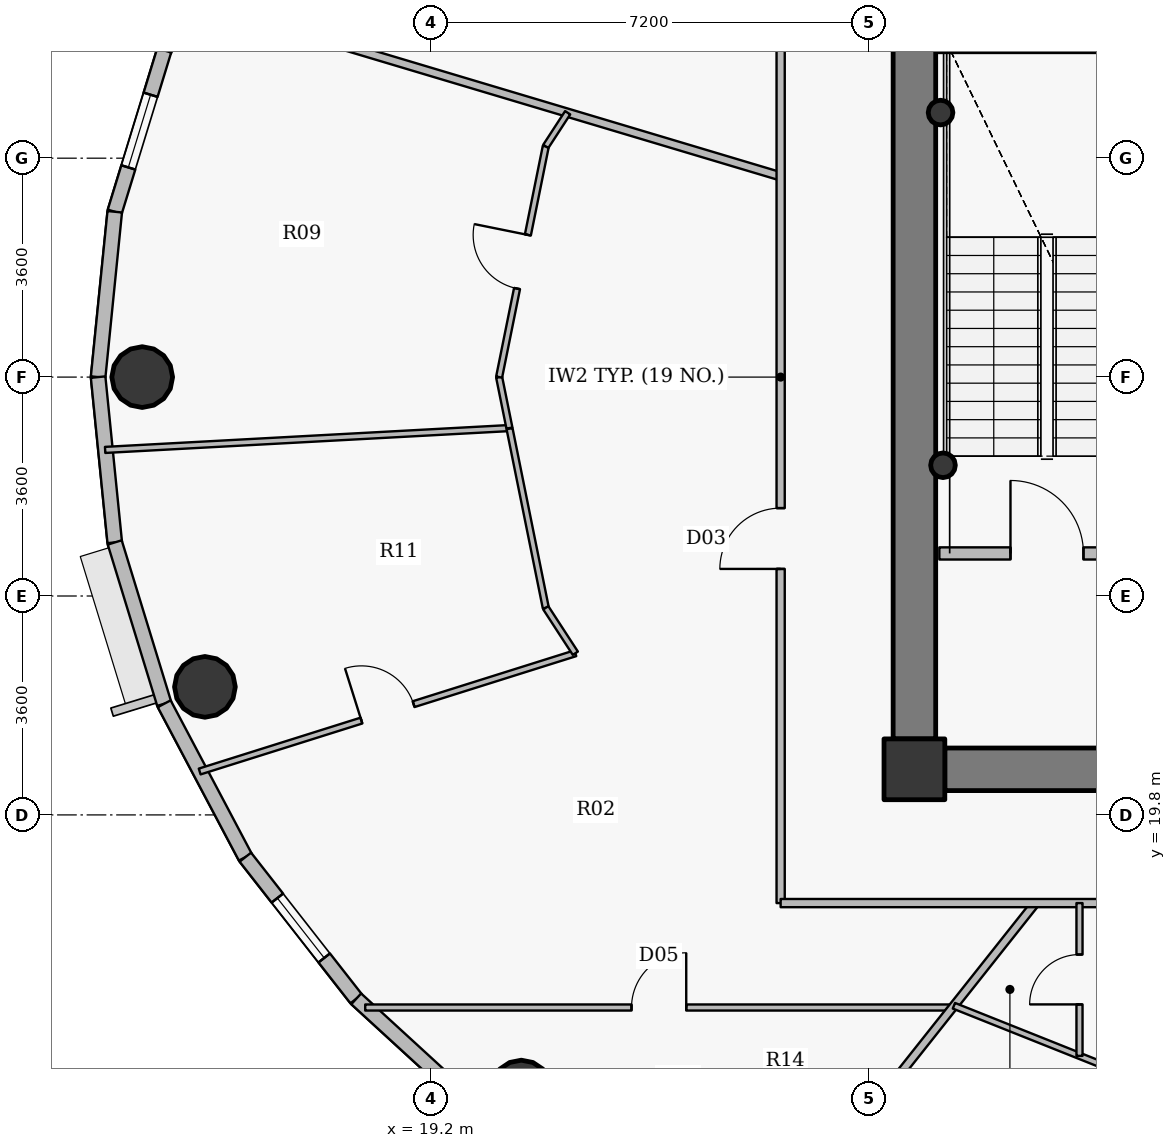
"""IFC4 building model, lengths in metres.
Left out: names, types, materials, properties, quantities, classifications, styles, units other than length and angle.
Written with IfcOpenShell. Run it as: python <this file> out.ifc"""

import sys

from ifc_helpers import new_model, si_unit, direction, frame, frame_2d, origin, origin_2d, place, context, subcontext, project, spatial, rectangle, hollow_circle, extrude, source, transform, mapped, element, fill, save


model = new_model("IFC4")
c1 = context("Model", 3, precision=1e-05, world=origin(), true_north=direction((0.0, 1.0)))
c2 = subcontext(c1, "Body", "Model", "MODEL_VIEW")
j1 = project(units=[si_unit("LENGTHUNIT", "METRE"), si_unit("PLANEANGLEUNIT", "RADIAN")], contexts=[c1])
p1 = place(None, origin())
s1 = spatial("IfcSite", under=j1, at=p1, CompositionType="ELEMENT")
p2 = place(p1, origin())
s2 = spatial("IfcBuilding", under=s1, at=p2, CompositionType="ELEMENT")
p3 = place(p2, frame((0.0, 0.0, 280.5)))
s3 = spatial("IfcBuildingStorey", under=s2, at=p3, CompositionType="ELEMENT", Elevation=280.5)
p4 = place(p3, frame((27.15, 20.55, 0.0), z_axis=(0.0, 0.0, 1.0), x_axis=(1.0, 0.0, 0.0)))
e1 = element("IfcColumn", 1, at=p4, inside=s3, PredefinedType="COLUMN", context=c2, shape_type="SweptSolid", body=[
    extrude(rectangle(XDim=1.0, YDim=1.0, at=origin_2d()), origin(), (0.0, 0.0, 1.0), 3.75),
])
for number, where, z_axis, x_axis in (
    (2, (27.58, 31.35, 0.0), (0.0, 0.0, 1.0), (1.0, 0.0, 0.0)),
    (3, (27.62, 25.55, 0.0), (0.0, 0.0, 1.0), (1.0, 0.0, 0.0)),
):
    element("IfcColumn", number, at=place(p3, frame(where, z_axis=z_axis, x_axis=x_axis)), inside=s3, PredefinedType="COLUMN", context=c2, shape_type="SweptSolid", body=[
        extrude(hollow_circle(Radius=0.203, WallThickness=0.016, at=origin_2d()), origin(), (0.0, 0.0, 1.0), 3.75),
    ])
p5 = place(p3, frame((44.35, 20.55, 0.0), z_axis=(0.0, 0.0, 1.0), x_axis=(-1.0, 0.0, 0.0)))
e4 = element("IfcWall", 4, at=p5, inside=s3, PredefinedType="SHEAR", context=c2, shape_type="SweptSolid", body=[
    extrude(rectangle(XDim=16.7, YDim=0.7, at=frame_2d((8.35, 0.0))), origin(), (0.0, 0.0, 1.0), 3.05),
])
p6 = place(p5, frame((12.925, 0.0, 0.0)))
e5 = element("IfcOpeningElement", 5, at=p6, cuts=e4, PredefinedType="OPENING", context=c2, shape_type="SweptSolid", body=[
    extrude(rectangle(XDim=1.15, YDim=2.15, at=origin_2d()), frame((0.575, 0.36, 1.075), z_axis=(0.0, -1.0, 0.0), x_axis=(1.0, 0.0, 0.0)), (0.0, 0.0, 1.0), 0.72),
])
p7 = place(p5, frame((9.1, 0.0, 0.0)))
e6 = element("IfcOpeningElement", 6, at=p7, cuts=e4, PredefinedType="OPENING", context=c2, shape_type="SweptSolid", body=[
    extrude(rectangle(XDim=1.15, YDim=2.15, at=origin_2d()), frame((0.575, 0.36, 1.075), z_axis=(0.0, -1.0, 0.0), x_axis=(1.0, 0.0, 0.0)), (0.0, 0.0, 1.0), 0.72),
])
p8 = place(p3, frame((27.15, 21.05, 0.0), z_axis=(0.0, 0.0, 1.0), x_axis=(0.0, 1.0, 0.0)))
e7 = element("IfcWall", 7, at=p8, inside=s3, PredefinedType="SHEAR", context=c2, shape_type="SweptSolid", body=[
    extrude(rectangle(XDim=11.9, YDim=0.7, at=frame_2d((5.95, 0.0))), origin(), (0.0, 0.0, 1.0), 3.05),
])
for number, where, z_axis, x_axis in (
    (8, (14.45, 27.0, 0.0), (0.0, 0.0, 1.0), (1.0, 0.0, 0.0)),
    (9, (15.481, 21.906, 0.0), (0.0, 0.0, 1.0), (1.0, 0.0, 0.0)),
    (10, (20.685, 15.267, 0.0), (0.0, 0.0, 1.0), (1.0, 0.0, 0.0)),
):
    element("IfcColumn", number, at=place(p3, frame(where, z_axis=z_axis, x_axis=x_axis)), inside=s3, PredefinedType="COLUMN", context=c2, shape_type="SweptSolid", body=[
        extrude(hollow_circle(Radius=0.5, WallThickness=0.032, at=origin_2d()), origin(), (0.0, 0.0, 1.0), 3.75),
    ])
p9 = place(p3, frame((14.812, 32.372, 0.0), z_axis=(0.0, 0.0, 1.0), x_axis=(0.467628269026, 0.883925224218, 0.0)))
e11 = element("IfcWall", 11, at=p9, inside=s3, PredefinedType="SOLIDWALL", context=c2, shape_type="SweptSolid", body=[
    extrude(rectangle(XDim=2.854, YDim=0.24, at=frame_2d((1.427, 0.0))), origin(), (0.0, 0.0, 1.0), 3.5),
])
p10 = place(p3, frame((13.998, 29.719, 0.0), z_axis=(0.0, 0.0, 1.0), x_axis=(0.2931213403, 0.956075248012, 0.0)))
e12 = element("IfcWall", 12, at=p10, inside=s3, PredefinedType="SOLIDWALL", context=c2, shape_type="SweptSolid", body=[
    extrude(rectangle(XDim=2.775, YDim=0.24, at=frame_2d((1.388, 0.0))), origin(), (0.0, 0.0, 1.0), 3.5),
])
p11 = place(p10, frame((0.763, 0.0, 0.9)))
e13 = element("IfcOpeningElement", 13, at=p11, cuts=e12, PredefinedType="OPENING", context=c2, shape_type="SweptSolid", body=[
    extrude(rectangle(XDim=1.25, YDim=1.65, at=origin_2d()), frame((0.625, 0.13, 0.825), z_axis=(0.0, -1.0, 0.0), x_axis=(1.0, 0.0, 0.0)), (0.0, 0.0, 1.0), 0.26),
])
for number, where, z_axis, x_axis in (
    (14, (13.725, 27.0, 0.0), (0.0, 0.0, 1.0), (0.1, 0.995, 0.0)),
    (15, (13.998, 24.281, 0.0), (0.0, 0.0, 1.0), (-0.1, 0.995, 0.0)),
):
    element("IfcWall", number, at=place(p3, frame(where, z_axis=z_axis, x_axis=x_axis)), inside=s3, PredefinedType="SOLIDWALL", context=c2, shape_type="SweptSolid", body=[
        extrude(rectangle(XDim=2.733, YDim=0.24, at=frame_2d((1.366, 0.0))), origin(), (0.0, 0.0, 1.0), 3.5),
    ])
p12 = place(p3, frame((14.812, 21.628, 0.0), z_axis=(0.0, 0.0, 1.0), x_axis=(-0.2931213403, 0.956075248012, 0.0)))
e16 = element("IfcWall", 16, at=p12, inside=s3, PredefinedType="SOLIDWALL", context=c2, shape_type="SweptSolid", body=[
    extrude(rectangle(XDim=2.775, YDim=0.24, at=frame_2d((1.388, 0.0))), origin(), (0.0, 0.0, 1.0), 3.5),
])
p13 = place(p3, frame((16.146, 19.105, 0.0), z_axis=(0.0, 0.0, 1.0), x_axis=(-0.467628269026, 0.883925224218, 0.0)))
e17 = element("IfcWall", 17, at=p13, inside=s3, PredefinedType="SOLIDWALL", context=c2, shape_type="SweptSolid", body=[
    extrude(rectangle(XDim=2.854, YDim=0.24, at=frame_2d((1.427, 0.0))), origin(), (0.0, 0.0, 1.0), 3.5),
])
p14 = place(p3, frame((17.97, 16.775, 0.0), z_axis=(0.0, 0.0, 1.0), x_axis=(-0.616337186556, 0.787482363275, 0.0)))
e18 = element("IfcWall", 18, at=p14, inside=s3, PredefinedType="SOLIDWALL", context=c2, shape_type="SweptSolid", body=[
    extrude(rectangle(XDim=2.958, YDim=0.24, at=frame_2d((1.479, 0.0))), origin(), (0.0, 0.0, 1.0), 3.5),
])
p15 = place(p14, frame((0.854, 0.0, 0.9)))
e19 = element("IfcOpeningElement", 19, at=p15, cuts=e18, PredefinedType="OPENING", context=c2, shape_type="SweptSolid", body=[
    extrude(rectangle(XDim=1.25, YDim=1.65, at=origin_2d()), frame((0.625, 0.13, 0.825), z_axis=(0.0, -1.0, 0.0), x_axis=(1.0, 0.0, 0.0)), (0.0, 0.0, 1.0), 0.26),
])
p16 = place(p3, frame((20.238, 14.696, 0.0), z_axis=(0.0, 0.0, 1.0), x_axis=(-0.737068506972, 0.675818034703, 0.0)))
e20 = element("IfcWall", 20, at=p16, inside=s3, PredefinedType="SOLIDWALL", context=c2, shape_type="SweptSolid", body=[
    extrude(rectangle(XDim=3.077, YDim=0.24, at=frame_2d((1.539, 0.0))), origin(), (0.0, 0.0, 1.0), 3.5),
])
p17 = place(p3, frame((13.84, 25.802, 0.0), z_axis=(0.0, 0.0, 1.0), x_axis=(0.998542593702, 0.05396932983, 0.0)))
e21 = element("IfcWall", 21, at=p17, inside=s3, PredefinedType="PARTITIONING", context=c2, shape_type="SweptSolid", body=[
    extrude(rectangle(XDim=6.659, YDim=0.1, at=frame_2d((3.33, 0.0))), origin(), (0.0, 0.0, 1.0), 2.985),
])
p18 = place(p3, frame((15.244, 33.2, 0.0), z_axis=(0.0, 0.0, 1.0), x_axis=(0.958167234785, -0.286208927508, 0.0)))
e22 = element("IfcWall", 22, at=p18, inside=s3, PredefinedType="PARTITIONING", context=c2, shape_type="SweptSolid", body=[
    extrude(rectangle(XDim=10.13, YDim=0.135, at=frame_2d((5.065, 0.0))), origin(), (0.0, 0.0, 1.0), 2.985),
])
p19 = place(p3, frame((15.396, 20.514, 0.0), z_axis=(0.0, 0.0, 1.0), x_axis=(0.95385684782, 0.300261742264, 0.0)))
e23 = element("IfcWall", 23, at=p19, inside=s3, PredefinedType="PARTITIONING", context=c2, shape_type="SweptSolid", body=[
    extrude(rectangle(XDim=6.477, YDim=0.1, at=frame_2d((3.239, 0.0))), origin(), (0.0, 0.0, 1.0), 2.985),
])
p20 = place(p19, frame((2.789, 0.0, 0.0)))
e24 = element("IfcOpeningElement", 24, at=p20, cuts=e23, PredefinedType="OPENING", context=c2, shape_type="SweptSolid", body=[
    extrude(rectangle(XDim=0.9, YDim=2.1, at=origin_2d()), frame((0.45, 0.06, 1.05), z_axis=(0.0, -1.0, 0.0), x_axis=(1.0, 0.0, 0.0)), (0.0, 0.0, 1.0), 0.12),
])
p21 = place(p3, frame((18.118, 16.633, 0.0), z_axis=(0.0, 0.0, 1.0), x_axis=(1.0, 0.0, 0.0)))
e25 = element("IfcWall", 25, at=p21, inside=s3, PredefinedType="PARTITIONING", context=c2, shape_type="SweptSolid", body=[
    extrude(rectangle(XDim=9.659, YDim=0.1, at=frame_2d((4.83, 0.0))), origin(), (0.0, 0.0, 1.0), 2.985),
])
p22 = place(p21, frame((4.379, 0.0, 0.0)))
e26 = element("IfcOpeningElement", 26, at=p22, cuts=e25, PredefinedType="OPENING", context=c2, shape_type="SweptSolid", body=[
    extrude(rectangle(XDim=0.9, YDim=2.1, at=origin_2d()), frame((0.45, 0.06, 1.05), z_axis=(0.0, -1.0, 0.0), x_axis=(1.0, 0.0, 0.0)), (0.0, 0.0, 1.0), 0.12),
])
p23 = place(p3, frame((20.32, 27.0, 0.0), z_axis=(0.0, 0.0, 1.0), x_axis=(0.198147261764, -0.980172261725, 0.0)))
e27 = element("IfcWall", 27, at=p23, inside=s3, PredefinedType="PARTITIONING", context=c2, shape_type="SweptSolid", body=[
    extrude(rectangle(XDim=0.855, YDim=0.1, at=frame_2d((0.427, 0.0))), origin(), (0.0, 0.0, 1.0), 3.035),
])
p24 = place(p3, frame((20.32, 27.0, 0.0), z_axis=(0.0, 0.0, 1.0), x_axis=(0.198226068862, 0.980156327135, 0.0)))
e28 = element("IfcWall", 28, at=p24, inside=s3, PredefinedType="PARTITIONING", context=c2, shape_type="SweptSolid", body=[
    extrude(rectangle(XDim=3.871, YDim=0.1, at=frame_2d((1.936, 0.0))), origin(), (0.0, 0.0, 1.0), 3.035),
])
p25 = place(p24, frame((1.486, 0.0, 0.0)))
e29 = element("IfcOpeningElement", 29, at=p25, cuts=e28, PredefinedType="OPENING", context=c2, shape_type="SweptSolid", body=[
    extrude(rectangle(XDim=0.9, YDim=2.1, at=origin_2d()), frame((0.45, 0.06, 1.05), z_axis=(0.0, -1.0, 0.0), x_axis=(1.0, 0.0, 0.0)), (0.0, 0.0, 1.0), 0.12),
])
p26 = place(p3, frame((20.491, 26.152, 0.0), z_axis=(0.0, 0.0, 1.0), x_axis=(0.198255475343, -0.980150379532, 0.0)))
e30 = element("IfcWall", 30, at=p26, inside=s3, PredefinedType="PARTITIONING", context=c2, shape_type="SweptSolid", body=[
    extrude(rectangle(XDim=3.006, YDim=0.1, at=frame_2d((1.503, 0.0))), origin(), (0.0, 0.0, 1.0), 3.035),
])
p27 = place(p3, frame((21.087, 23.206, 0.0), z_axis=(0.0, 0.0, 1.0), x_axis=(0.545565820765, -0.838067977681, 0.0)))
e31 = element("IfcWall", 31, at=p27, inside=s3, PredefinedType="PARTITIONING", context=c2, shape_type="SweptSolid", body=[
    extrude(rectangle(XDim=0.891, YDim=0.1, at=frame_2d((0.446, 0.0))), origin(), (0.0, 0.0, 1.0), 3.035),
])
p28 = place(p3, frame((21.087, 30.794, 0.0), z_axis=(0.0, 0.0, 1.0), x_axis=(0.545443507803, 0.838147588313, 0.0)))
e32 = element("IfcWall", 32, at=p28, inside=s3, PredefinedType="PARTITIONING", context=c2, shape_type="SweptSolid", body=[
    extrude(rectangle(XDim=0.66, YDim=0.1, at=frame_2d((0.33, 0.0))), origin(), (0.0, 0.0, 1.0), 3.5),
])
p29 = place(p3, frame((24.294, 12.242, 0.0), z_axis=(0.0, 0.0, 1.0), x_axis=(0.621439784824, 0.783461928774, 0.0)))
e33 = element("IfcWall", 33, at=p29, inside=s3, PredefinedType="PARTITIONING", context=c2, shape_type="SweptSolid", body=[
    extrude(rectangle(XDim=7.796, YDim=0.135, at=frame_2d((3.898, 0.0))), origin(), (0.0, 0.0, 1.0), 2.985),
])
p30 = place(p3, frame((24.95, 18.35, 0.0), z_axis=(0.0, 0.0, 1.0), x_axis=(0.0, 1.0, 0.0)))
e34 = element("IfcWall", 34, at=p30, inside=s3, PredefinedType="PARTITIONING", context=c2, shape_type="SweptSolid", body=[
    extrude(rectangle(XDim=17.3, YDim=0.135, at=frame_2d((8.65, 0.0))), origin(), (0.0, 0.0, 1.0), 3.035),
])
p31 = place(p30, frame((5.495, 0.0, 0.0)))
e35 = element("IfcOpeningElement", 35, at=p31, cuts=e34, PredefinedType="OPENING", context=c2, shape_type="SweptSolid", body=[
    extrude(rectangle(XDim=1.0, YDim=2.15, at=origin_2d()), frame((0.5, 0.078, 1.075), z_axis=(0.0, -1.0, 0.0), x_axis=(1.0, 0.0, 0.0)), (0.0, 0.0, 1.0), 0.155),
])
p32 = place(p3, frame((24.95, 18.35, 0.0), z_axis=(0.0, 0.0, 1.0), x_axis=(1.0, 0.0, 0.0)))
e36 = element("IfcWall", 36, at=p32, inside=s3, PredefinedType="PARTITIONING", context=c2, shape_type="SweptSolid", body=[
    extrude(rectangle(XDim=10.1, YDim=0.135, at=frame_2d((5.05, 0.0))), origin(), (0.0, 0.0, 1.0), 3.035),
])
p33 = place(p3, frame((27.56, 24.1, 0.0), z_axis=(0.0, 0.0, 1.0), x_axis=(1.0, 0.0, 0.0)))
e37 = element("IfcWall", 37, at=p33, inside=s3, PredefinedType="PARTITIONING", context=c2, shape_type="SweptSolid", body=[
    extrude(rectangle(XDim=3.54, YDim=0.2, at=frame_2d((1.77, 0.0))), origin(), (0.0, 0.0, 1.0), 3.5),
])
p34 = place(p33, frame((1.17, 0.0, 0.0)))
e38 = element("IfcOpeningElement", 38, at=p34, cuts=e37, PredefinedType="OPENING", context=c2, shape_type="SweptSolid", body=[
    extrude(rectangle(XDim=1.2, YDim=2.15, at=origin_2d()), frame((0.6, 0.11, 1.075), z_axis=(0.0, -1.0, 0.0), x_axis=(1.0, 0.0, 0.0)), (0.0, 0.0, 1.0), 0.22),
])
p35 = place(p3, frame((27.8, 16.662, 0.0), z_axis=(0.0, 0.0, 1.0), x_axis=(0.928783988526, -0.370621508628, 0.0)))
e39 = element("IfcWall", 39, at=p35, inside=s3, PredefinedType="PARTITIONING", context=c2, shape_type="SweptSolid", body=[
    extrude(rectangle(XDim=3.613, YDim=0.1, at=frame_2d((1.806, 0.0))), origin(), (0.0, 0.0, 1.0), 3.035),
])
p36 = place(p3, frame((29.865, 15.837, 0.0), z_axis=(0.0, 0.0, 1.0), x_axis=(0.0, 1.0, 0.0)))
e40 = element("IfcWall", 40, at=p36, inside=s3, PredefinedType="PARTITIONING", context=c2, shape_type="SweptSolid", body=[
    extrude(rectangle(XDim=2.513, YDim=0.1, at=frame_2d((1.256, 0.0))), origin(), (0.0, 0.0, 1.0), 3.035),
])
p37 = place(p36, frame((0.846, 0.0, 0.0)))
e41 = element("IfcOpeningElement", 41, at=p37, cuts=e40, PredefinedType="OPENING", context=c2, shape_type="SweptSolid", body=[
    extrude(rectangle(XDim=0.82, YDim=2.1, at=origin_2d()), frame((0.41, 0.06, 1.05), z_axis=(0.0, -1.0, 0.0), x_axis=(1.0, 0.0, 0.0)), (0.0, 0.0, 1.0), 0.12),
])
p38 = place(p3, frame((26.8, 21.04, 0.0), z_axis=(0.0, 0.0, 1.0), x_axis=(0.0, -1.0, 0.0)))
e42 = element("IfcWall", 42, at=p38, inside=s3, PredefinedType="PARTITIONING", context=c2, shape_type="SweptSolid", body=[
    extrude(rectangle(XDim=0.84, YDim=0.135, at=frame_2d((0.42, 0.0))), origin(), (0.0, 0.0, 1.0), 3.035),
])
p39 = place(p3, frame((27.107, 20.2, 0.0), z_axis=(0.0, 0.0, 1.0), x_axis=(1.0, 0.0, 0.0)))
e43 = element("IfcWall", 43, at=p39, inside=s3, PredefinedType="PARTITIONING", context=c2, shape_type="SweptSolid", body=[
    extrude(rectangle(XDim=0.532, YDim=0.135, at=frame_2d((0.266, 0.0))), origin(), (0.0, 0.0, 1.0), 3.035),
])
m1 = source(origin(), c2, "Body", "SweptSolid", [
    extrude(rectangle(XDim=1.25, YDim=1.65, at=origin_2d()), frame((0.625, 0.03, 0.825), z_axis=(0.0, -1.0, 0.0), x_axis=(1.0, 0.0, 0.0)), (0.0, 0.0, 1.0), 0.06),
])
p40 = place(p11, origin())
e44 = element("IfcWindow", 44, at=p40, inside=s3, PartitioningType="SINGLE_PANEL", PredefinedType="WINDOW", context=c2, shape_type="MappedRepresentation", body=[
    mapped(m1, transform((0.0, 0.0, 0.0), x_axis=(1.0, 0.0, 0.0), y_axis=(0.0, 1.0, 0.0), z_axis=(0.0, 0.0, 1.0), scale=1.0)),
])
fill(e13, e44)
p41 = place(p15, origin())
e45 = element("IfcWindow", 45, at=p41, inside=s3, PartitioningType="SINGLE_PANEL", PredefinedType="WINDOW", context=c2, shape_type="MappedRepresentation", body=[
    mapped(m1, transform((0.0, 0.0, 0.0), x_axis=(1.0, 0.0, 0.0), y_axis=(0.0, 1.0, 0.0), z_axis=(0.0, 0.0, 1.0), scale=1.0)),
])
fill(e19, e45)
m2 = source(origin(), c2, "Body", "SweptSolid", [
    extrude(rectangle(XDim=1.2, YDim=2.15, at=origin_2d()), frame((0.6, 0.025, 1.075), z_axis=(0.0, -1.0, 0.0), x_axis=(1.0, 0.0, 0.0)), (0.0, 0.0, 1.0), 0.05),
])
p42 = place(p34, origin())
e46 = element("IfcDoor", 46, at=p42, inside=s3, OperationType="SINGLE_SWING_LEFT", PredefinedType="DOOR", context=c2, shape_type="MappedRepresentation", body=[
    mapped(m2, transform((0.0, 0.0, 0.0), x_axis=(1.0, 0.0, 0.0), y_axis=(0.0, 1.0, 0.0), z_axis=(0.0, 0.0, 1.0), scale=1.0)),
])
fill(e38, e46)
m3 = source(origin(), c2, "Body", "SweptSolid", [
    extrude(rectangle(XDim=1.0, YDim=2.15, at=origin_2d()), frame((0.5, 0.025, 1.075), z_axis=(0.0, -1.0, 0.0), x_axis=(1.0, 0.0, 0.0)), (0.0, 0.0, 1.0), 0.05),
])
p43 = place(p31, origin())
e47 = element("IfcDoor", 47, at=p43, inside=s3, OperationType="SINGLE_SWING_LEFT", PredefinedType="DOOR", context=c2, shape_type="MappedRepresentation", body=[
    mapped(m3, transform((0.0, 0.0, 0.0), x_axis=(1.0, 0.0, 0.0), y_axis=(0.0, 1.0, 0.0), z_axis=(0.0, 0.0, 1.0), scale=1.0)),
])
fill(e35, e47)
m4 = source(origin(), c2, "Body", "SweptSolid", [
    extrude(rectangle(XDim=0.9, YDim=2.1, at=origin_2d()), frame((0.45, 0.025, 1.05), z_axis=(0.0, -1.0, 0.0), x_axis=(1.0, 0.0, 0.0)), (0.0, 0.0, 1.0), 0.05),
])
p44 = place(p25, origin())
e48 = element("IfcDoor", 48, at=p44, inside=s3, OperationType="SINGLE_SWING_RIGHT", PredefinedType="DOOR", context=c2, shape_type="MappedRepresentation", body=[
    mapped(m4, transform((0.0, 0.0, 0.0), x_axis=(1.0, 0.0, 0.0), y_axis=(0.0, 1.0, 0.0), z_axis=(0.0, 0.0, 1.0), scale=1.0)),
])
fill(e29, e48)
p45 = place(p20, origin())
e49 = element("IfcDoor", 49, at=p45, inside=s3, OperationType="SINGLE_SWING_LEFT", PredefinedType="DOOR", context=c2, shape_type="MappedRepresentation", body=[
    mapped(m4, transform((0.0, 0.0, 0.0), x_axis=(1.0, 0.0, 0.0), y_axis=(0.0, 1.0, 0.0), z_axis=(0.0, 0.0, 1.0), scale=1.0)),
])
fill(e24, e49)
p46 = place(p22, origin())
e50 = element("IfcDoor", 50, at=p46, inside=s3, OperationType="SINGLE_SWING_RIGHT", PredefinedType="DOOR", context=c2, shape_type="MappedRepresentation", body=[
    mapped(m4, transform((0.0, 0.0, 0.0), x_axis=(1.0, 0.0, 0.0), y_axis=(0.0, 1.0, 0.0), z_axis=(0.0, 0.0, 1.0), scale=1.0)),
])
fill(e26, e50)
m5 = source(origin(), c2, "Body", "SweptSolid", [
    extrude(rectangle(XDim=0.82, YDim=2.1, at=origin_2d()), frame((0.41, 0.025, 1.05), z_axis=(0.0, -1.0, 0.0), x_axis=(1.0, 0.0, 0.0)), (0.0, 0.0, 1.0), 0.05),
])
p47 = place(p37, origin())
e51 = element("IfcDoor", 51, at=p47, inside=s3, OperationType="SINGLE_SWING_LEFT", PredefinedType="DOOR", context=c2, shape_type="MappedRepresentation", body=[
    mapped(m5, transform((0.0, 0.0, 0.0), x_axis=(1.0, 0.0, 0.0), y_axis=(0.0, 1.0, 0.0), z_axis=(0.0, 0.0, 1.0), scale=1.0)),
])
fill(e41, e51)
save(model, sys.argv[1])
